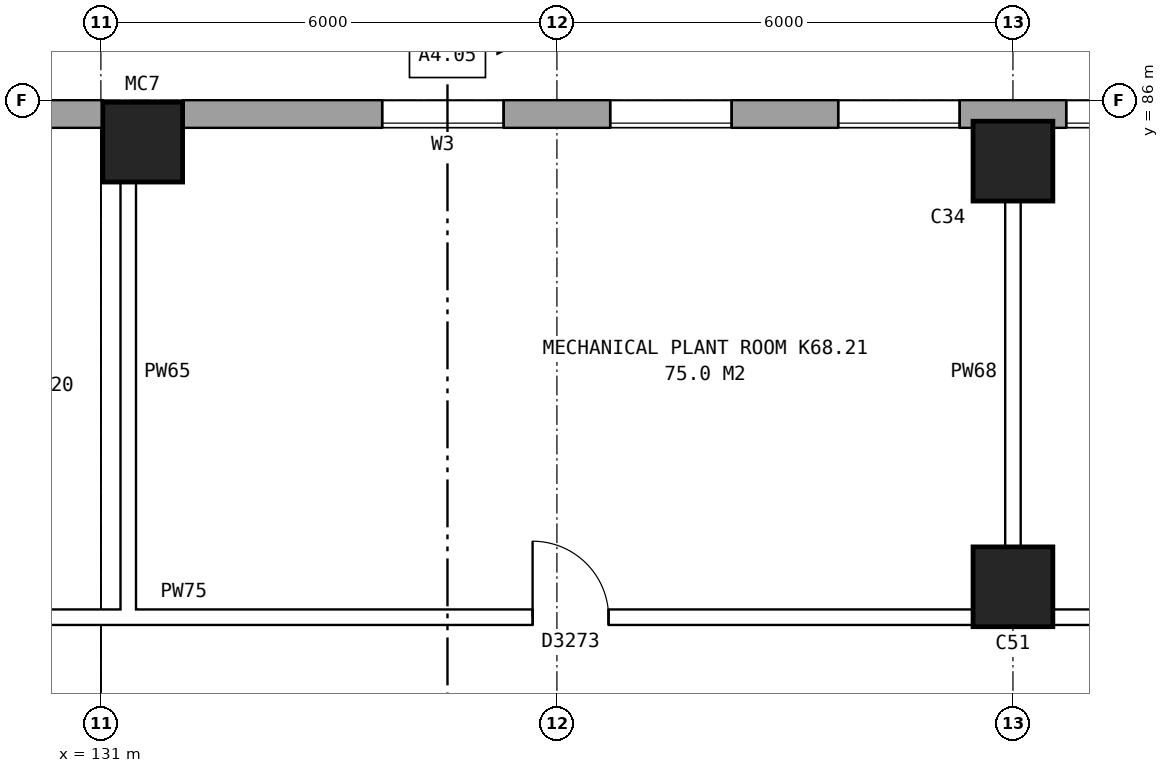
"""IFC4 building model, lengths in metres.
Left out: names, types, materials, properties, quantities, classifications, styles, units other than length and angle.
Written with IfcOpenShell. Run it as: python <this file> out.ifc"""

import sys

from ifc_helpers import new_model, si_unit, direction, frame, frame_2d, origin, origin_2d, place, context, subcontext, project, spatial, rectangle, hollow_rectangle, extrude, element, fill, save


model = new_model("IFC4")
c1 = context("Model", 3, precision=1e-05, world=origin(), true_north=direction((0.0, 1.0)))
c2 = subcontext(c1, "Body", "Model", "MODEL_VIEW")
j1 = project(units=[si_unit("LENGTHUNIT", "METRE"), si_unit("PLANEANGLEUNIT", "RADIAN")], contexts=[c1])
p1 = place(None, origin())
s1 = spatial("IfcSite", under=j1, at=p1, CompositionType="ELEMENT")
p2 = place(p1, origin())
s2 = spatial("IfcBuilding", under=s1, at=p2, CompositionType="ELEMENT")
p3 = place(p2, frame((0.0, 0.0, 243.9)))
s3 = spatial("IfcBuildingStorey", under=s2, at=p3, CompositionType="ELEMENT", Elevation=243.9)
p4 = place(p3, frame((143.0, 79.6, 0.0), z_axis=(0.0, 0.0, 1.0), x_axis=(1.0, 0.0, 0.0)))
e1 = element("IfcColumn", 1, at=p4, inside=s3, PredefinedType="COLUMN", context=c2, shape_type="SweptSolid", body=[
    extrude(rectangle(XDim=1.05, YDim=1.05, at=origin_2d()), origin(), (0.0, 0.0, 1.0), 15.563),
])
p5 = place(p3, frame((143.0, 85.2, 0.0), z_axis=(0.0, 0.0, 1.0), x_axis=(1.0, 0.0, 0.0)))
e2 = element("IfcColumn", 2, at=p5, inside=s3, PredefinedType="COLUMN", context=c2, shape_type="SweptSolid", body=[
    extrude(rectangle(XDim=1.05, YDim=1.05, at=origin_2d()), origin(), (0.0, 0.0, 1.0), 18.363),
])
p6 = place(p3, frame((131.55, 85.45, 0.0), z_axis=(0.0, 0.0, 1.0), x_axis=(1.0, 0.0, 0.0)))
e3 = element("IfcColumn", 3, at=p6, inside=s3, PredefinedType="COLUMN", context=c2, shape_type="SweptSolid", body=[
    extrude(hollow_rectangle(XDim=1.05, YDim=1.05, WallThickness=0.053, at=origin_2d()), origin(), (0.0, 0.0, 1.0), 18.488),
])
p7 = place(p3, frame((165.925, 85.82, 0.0), z_axis=(0.0, 0.0, 1.0), x_axis=(-1.0, 0.0, 0.0)))
e4 = element("IfcWall", 4, at=p7, inside=s3, PredefinedType="STANDARD", context=c2, shape_type="SweptSolid", body=[
    extrude(rectangle(XDim=33.85, YDim=0.36, at=frame_2d((16.925, 0.0))), origin(), (0.0, 0.0, 1.0), 19.21),
])
p8 = place(p7, frame((29.625, 0.0, 1.5)))
e5 = element("IfcOpeningElement", 5, at=p8, cuts=e4, PredefinedType="OPENING", context=c2, shape_type="SweptSolid", body=[
    extrude(rectangle(XDim=1.6, YDim=1.2, at=frame_2d((0.8, 0.6))), frame((0.0, 0.19, 0.0), z_axis=(0.0, -1.0, 0.0), x_axis=(1.0, 0.0, 0.0)), (0.0, 0.0, 1.0), 0.38),
])
p9 = place(p7, frame((26.625, 0.0, 1.5)))
e6 = element("IfcOpeningElement", 6, at=p9, cuts=e4, PredefinedType="OPENING", context=c2, shape_type="SweptSolid", body=[
    extrude(rectangle(XDim=1.6, YDim=1.2, at=frame_2d((0.8, 0.6))), frame((0.0, 0.19, 0.0), z_axis=(0.0, -1.0, 0.0), x_axis=(1.0, 0.0, 0.0)), (0.0, 0.0, 1.0), 0.38),
])
p10 = place(p7, frame((23.625, 0.0, 1.5)))
e7 = element("IfcOpeningElement", 7, at=p10, cuts=e4, PredefinedType="OPENING", context=c2, shape_type="SweptSolid", body=[
    extrude(rectangle(XDim=1.6, YDim=1.2, at=frame_2d((0.8, 0.6))), frame((0.0, 0.19, 0.0), z_axis=(0.0, -1.0, 0.0), x_axis=(1.0, 0.0, 0.0)), (0.0, 0.0, 1.0), 0.38),
])
p11 = place(p7, frame((20.625, 0.0, 1.5)))
e8 = element("IfcOpeningElement", 8, at=p11, cuts=e4, PredefinedType="OPENING", context=c2, shape_type="SweptSolid", body=[
    extrude(rectangle(XDim=1.6, YDim=1.2, at=frame_2d((0.8, 0.6))), frame((0.0, 0.19, 0.0), z_axis=(0.0, -1.0, 0.0), x_axis=(1.0, 0.0, 0.0)), (0.0, 0.0, 1.0), 0.38),
])
p12 = place(p7, frame((17.625, 0.0, 1.5)))
e9 = element("IfcOpeningElement", 9, at=p12, cuts=e4, PredefinedType="OPENING", context=c2, shape_type="SweptSolid", body=[
    extrude(rectangle(XDim=1.6, YDim=1.2, at=frame_2d((0.8, 0.6))), frame((0.0, 0.19, 0.0), z_axis=(0.0, -1.0, 0.0), x_axis=(1.0, 0.0, 0.0)), (0.0, 0.0, 1.0), 0.38),
])
p13 = place(p7, frame((14.625, 0.0, 1.5)))
e10 = element("IfcOpeningElement", 10, at=p13, cuts=e4, PredefinedType="OPENING", context=c2, shape_type="SweptSolid", body=[
    extrude(rectangle(XDim=1.6, YDim=1.2, at=frame_2d((0.8, 0.6))), frame((0.0, 0.19, 0.0), z_axis=(0.0, -1.0, 0.0), x_axis=(1.0, 0.0, 0.0)), (0.0, 0.0, 1.0), 0.38),
])
p14 = place(p7, frame((11.625, 0.0, 1.5)))
e11 = element("IfcOpeningElement", 11, at=p14, cuts=e4, PredefinedType="OPENING", context=c2, shape_type="SweptSolid", body=[
    extrude(rectangle(XDim=1.6, YDim=1.2, at=frame_2d((0.8, 0.6))), frame((0.0, 0.19, 0.0), z_axis=(0.0, -1.0, 0.0), x_axis=(1.0, 0.0, 0.0)), (0.0, 0.0, 1.0), 0.38),
])
p15 = place(p7, frame((8.625, 0.0, 1.5)))
e12 = element("IfcOpeningElement", 12, at=p15, cuts=e4, PredefinedType="OPENING", context=c2, shape_type="SweptSolid", body=[
    extrude(rectangle(XDim=1.6, YDim=1.2, at=frame_2d((0.8, 0.6))), frame((0.0, 0.19, 0.0), z_axis=(0.0, -1.0, 0.0), x_axis=(1.0, 0.0, 0.0)), (0.0, 0.0, 1.0), 0.38),
])
p16 = place(p7, frame((5.625, 0.0, 1.5)))
e13 = element("IfcOpeningElement", 13, at=p16, cuts=e4, PredefinedType="OPENING", context=c2, shape_type="SweptSolid", body=[
    extrude(rectangle(XDim=1.6, YDim=1.2, at=frame_2d((0.8, 0.6))), frame((0.0, 0.19, 0.0), z_axis=(0.0, -1.0, 0.0), x_axis=(1.0, 0.0, 0.0)), (0.0, 0.0, 1.0), 0.38),
])
p17 = place(p7, frame((2.625, 0.0, 1.5)))
e14 = element("IfcOpeningElement", 14, at=p17, cuts=e4, PredefinedType="OPENING", context=c2, shape_type="SweptSolid", body=[
    extrude(rectangle(XDim=1.6, YDim=1.2, at=frame_2d((0.8, 0.6))), frame((0.0, 0.19, 0.0), z_axis=(0.0, -1.0, 0.0), x_axis=(1.0, 0.0, 0.0)), (0.0, 0.0, 1.0), 0.38),
])
p18 = place(p3, frame((131.025, 85.82, 0.0), z_axis=(0.0, 0.0, 1.0), x_axis=(-1.0, 0.0, 0.0)))
e15 = element("IfcWall", 15, at=p18, inside=s3, PredefinedType="STANDARD", context=c2, shape_type="SweptSolid", body=[
    extrude(rectangle(XDim=55.05, YDim=0.36, at=frame_2d((27.525, 0.0))), origin(), (0.0, 0.0, 1.0), 19.21),
])
p19 = place(p18, frame((52.506, 0.0, 1.5)))
e16 = element("IfcOpeningElement", 16, at=p19, cuts=e15, PredefinedType="OPENING", context=c2, shape_type="SweptSolid", body=[
    extrude(rectangle(XDim=1.6, YDim=1.2, at=frame_2d((0.8, 0.6))), frame((0.0, 0.19, 0.0), z_axis=(0.0, -1.0, 0.0), x_axis=(1.0, 0.0, 0.0)), (0.0, 0.0, 1.0), 0.38),
])
p20 = place(p18, frame((49.069, 0.0, 1.5)))
e17 = element("IfcOpeningElement", 17, at=p20, cuts=e15, PredefinedType="OPENING", context=c2, shape_type="SweptSolid", body=[
    extrude(rectangle(XDim=1.6, YDim=1.2, at=frame_2d((0.8, 0.6))), frame((0.0, 0.19, 0.0), z_axis=(0.0, -1.0, 0.0), x_axis=(1.0, 0.0, 0.0)), (0.0, 0.0, 1.0), 0.38),
])
p21 = place(p18, frame((45.631, 0.0, 1.5)))
e18 = element("IfcOpeningElement", 18, at=p21, cuts=e15, PredefinedType="OPENING", context=c2, shape_type="SweptSolid", body=[
    extrude(rectangle(XDim=1.6, YDim=1.2, at=frame_2d((0.8, 0.6))), frame((0.0, 0.19, 0.0), z_axis=(0.0, -1.0, 0.0), x_axis=(1.0, 0.0, 0.0)), (0.0, 0.0, 1.0), 0.38),
])
p22 = place(p18, frame((42.194, 0.0, 1.5)))
e19 = element("IfcOpeningElement", 19, at=p22, cuts=e15, PredefinedType="OPENING", context=c2, shape_type="SweptSolid", body=[
    extrude(rectangle(XDim=1.6, YDim=1.2, at=frame_2d((0.8, 0.6))), frame((0.0, 0.19, 0.0), z_axis=(0.0, -1.0, 0.0), x_axis=(1.0, 0.0, 0.0)), (0.0, 0.0, 1.0), 0.38),
])
p23 = place(p18, frame((38.756, 0.0, 1.5)))
e20 = element("IfcOpeningElement", 20, at=p23, cuts=e15, PredefinedType="OPENING", context=c2, shape_type="SweptSolid", body=[
    extrude(rectangle(XDim=1.6, YDim=1.2, at=frame_2d((0.8, 0.6))), frame((0.0, 0.19, 0.0), z_axis=(0.0, -1.0, 0.0), x_axis=(1.0, 0.0, 0.0)), (0.0, 0.0, 1.0), 0.38),
])
p24 = place(p18, frame((35.319, 0.0, 1.5)))
e21 = element("IfcOpeningElement", 21, at=p24, cuts=e15, PredefinedType="OPENING", context=c2, shape_type="SweptSolid", body=[
    extrude(rectangle(XDim=1.6, YDim=1.2, at=frame_2d((0.8, 0.6))), frame((0.0, 0.19, 0.0), z_axis=(0.0, -1.0, 0.0), x_axis=(1.0, 0.0, 0.0)), (0.0, 0.0, 1.0), 0.38),
])
p25 = place(p18, frame((31.881, 0.0, 1.5)))
e22 = element("IfcOpeningElement", 22, at=p25, cuts=e15, PredefinedType="OPENING", context=c2, shape_type="SweptSolid", body=[
    extrude(rectangle(XDim=1.6, YDim=1.2, at=frame_2d((0.8, 0.6))), frame((0.0, 0.19, 0.0), z_axis=(0.0, -1.0, 0.0), x_axis=(1.0, 0.0, 0.0)), (0.0, 0.0, 1.0), 0.38),
])
p26 = place(p18, frame((28.444, 0.0, 1.5)))
e23 = element("IfcOpeningElement", 23, at=p26, cuts=e15, PredefinedType="OPENING", context=c2, shape_type="SweptSolid", body=[
    extrude(rectangle(XDim=1.6, YDim=1.2, at=frame_2d((0.8, 0.6))), frame((0.0, 0.19, 0.0), z_axis=(0.0, -1.0, 0.0), x_axis=(1.0, 0.0, 0.0)), (0.0, 0.0, 1.0), 0.38),
])
p27 = place(p18, frame((25.006, 0.0, 1.5)))
e24 = element("IfcOpeningElement", 24, at=p27, cuts=e15, PredefinedType="OPENING", context=c2, shape_type="SweptSolid", body=[
    extrude(rectangle(XDim=1.6, YDim=1.2, at=frame_2d((0.8, 0.6))), frame((0.0, 0.19, 0.0), z_axis=(0.0, -1.0, 0.0), x_axis=(1.0, 0.0, 0.0)), (0.0, 0.0, 1.0), 0.38),
])
p28 = place(p18, frame((21.569, 0.0, 1.5)))
e25 = element("IfcOpeningElement", 25, at=p28, cuts=e15, PredefinedType="OPENING", context=c2, shape_type="SweptSolid", body=[
    extrude(rectangle(XDim=1.6, YDim=1.2, at=frame_2d((0.8, 0.6))), frame((0.0, 0.19, 0.0), z_axis=(0.0, -1.0, 0.0), x_axis=(1.0, 0.0, 0.0)), (0.0, 0.0, 1.0), 0.38),
])
p29 = place(p18, frame((18.131, 0.0, 1.5)))
e26 = element("IfcOpeningElement", 26, at=p29, cuts=e15, PredefinedType="OPENING", context=c2, shape_type="SweptSolid", body=[
    extrude(rectangle(XDim=1.6, YDim=1.2, at=frame_2d((0.8, 0.6))), frame((0.0, 0.19, 0.0), z_axis=(0.0, -1.0, 0.0), x_axis=(1.0, 0.0, 0.0)), (0.0, 0.0, 1.0), 0.38),
])
p30 = place(p18, frame((14.694, 0.0, 1.5)))
e27 = element("IfcOpeningElement", 27, at=p30, cuts=e15, PredefinedType="OPENING", context=c2, shape_type="SweptSolid", body=[
    extrude(rectangle(XDim=1.6, YDim=1.2, at=frame_2d((0.8, 0.6))), frame((0.0, 0.19, 0.0), z_axis=(0.0, -1.0, 0.0), x_axis=(1.0, 0.0, 0.0)), (0.0, 0.0, 1.0), 0.38),
])
p31 = place(p18, frame((11.256, 0.0, 1.5)))
e28 = element("IfcOpeningElement", 28, at=p31, cuts=e15, PredefinedType="OPENING", context=c2, shape_type="SweptSolid", body=[
    extrude(rectangle(XDim=1.6, YDim=1.2, at=frame_2d((0.8, 0.6))), frame((0.0, 0.19, 0.0), z_axis=(0.0, -1.0, 0.0), x_axis=(1.0, 0.0, 0.0)), (0.0, 0.0, 1.0), 0.38),
])
p32 = place(p18, frame((7.819, 0.0, 1.5)))
e29 = element("IfcOpeningElement", 29, at=p32, cuts=e15, PredefinedType="OPENING", context=c2, shape_type="SweptSolid", body=[
    extrude(rectangle(XDim=1.6, YDim=1.2, at=frame_2d((0.8, 0.6))), frame((0.0, 0.19, 0.0), z_axis=(0.0, -1.0, 0.0), x_axis=(1.0, 0.0, 0.0)), (0.0, 0.0, 1.0), 0.38),
])
p33 = place(p18, frame((4.381, 0.0, 1.5)))
e30 = element("IfcOpeningElement", 30, at=p33, cuts=e15, PredefinedType="OPENING", context=c2, shape_type="SweptSolid", body=[
    extrude(rectangle(XDim=1.6, YDim=1.2, at=frame_2d((0.8, 0.6))), frame((0.0, 0.19, 0.0), z_axis=(0.0, -1.0, 0.0), x_axis=(1.0, 0.0, 0.0)), (0.0, 0.0, 1.0), 0.38),
])
p34 = place(p18, frame((0.944, 0.0, 1.5)))
e31 = element("IfcOpeningElement", 31, at=p34, cuts=e15, PredefinedType="OPENING", context=c2, shape_type="SweptSolid", body=[
    extrude(rectangle(XDim=1.6, YDim=1.2, at=frame_2d((0.8, 0.6))), frame((0.0, 0.19, 0.0), z_axis=(0.0, -1.0, 0.0), x_axis=(1.0, 0.0, 0.0)), (0.0, 0.0, 1.0), 0.38),
])
p35 = place(p3, frame((32.24, 79.2, 0.0), z_axis=(0.0, 0.0, 1.0), x_axis=(1.0, 0.0, 0.0)))
e32 = element("IfcWall", 32, at=p35, inside=s3, PredefinedType="PARTITIONING", context=c2, shape_type="SweptSolid", body=[
    extrude(rectangle(XDim=136.52, YDim=0.2, at=frame_2d((68.26, 0.0))), origin(), (0.0, 0.0, 1.0), 3.3),
])
p36 = place(p35, frame((3.44, 0.0, 0.0)))
e33 = element("IfcOpeningElement", 33, at=p36, cuts=e32, PredefinedType="OPENING", context=c2, shape_type="SweptSolid", body=[
    extrude(rectangle(XDim=1.0, YDim=2.1, at=frame_2d((0.5, 1.05))), frame((0.0, 0.11, 0.0), z_axis=(0.0, -1.0, 0.0), x_axis=(1.0, 0.0, 0.0)), (0.0, 0.0, 1.0), 0.22),
])
p37 = place(p35, frame((13.26, 0.0, 0.0)))
e34 = element("IfcOpeningElement", 34, at=p37, cuts=e32, PredefinedType="OPENING", context=c2, shape_type="SweptSolid", body=[
    extrude(rectangle(XDim=1.0, YDim=2.1, at=frame_2d((0.5, 1.05))), frame((0.0, 0.11, 0.0), z_axis=(0.0, -1.0, 0.0), x_axis=(1.0, 0.0, 0.0)), (0.0, 0.0, 1.0), 0.22),
])
p38 = place(p35, frame((25.26, 0.0, 0.0)))
e35 = element("IfcOpeningElement", 35, at=p38, cuts=e32, PredefinedType="OPENING", context=c2, shape_type="SweptSolid", body=[
    extrude(rectangle(XDim=1.0, YDim=2.1, at=frame_2d((0.5, 1.05))), frame((0.0, 0.11, 0.0), z_axis=(0.0, -1.0, 0.0), x_axis=(1.0, 0.0, 0.0)), (0.0, 0.0, 1.0), 0.22),
])
p39 = place(p35, frame((37.08, 0.0, 0.0)))
e36 = element("IfcOpeningElement", 36, at=p39, cuts=e32, PredefinedType="OPENING", context=c2, shape_type="SweptSolid", body=[
    extrude(rectangle(XDim=1.0, YDim=2.1, at=frame_2d((0.5, 1.05))), frame((0.0, 0.11, 0.0), z_axis=(0.0, -1.0, 0.0), x_axis=(1.0, 0.0, 0.0)), (0.0, 0.0, 1.0), 0.22),
])
p40 = place(p35, frame((49.955, 0.0, 0.0)))
e37 = element("IfcOpeningElement", 37, at=p40, cuts=e32, PredefinedType="OPENING", context=c2, shape_type="SweptSolid", body=[
    extrude(rectangle(XDim=1.0, YDim=2.1, at=frame_2d((0.5, 1.05))), frame((0.0, 0.11, 0.0), z_axis=(0.0, -1.0, 0.0), x_axis=(1.0, 0.0, 0.0)), (0.0, 0.0, 1.0), 0.22),
])
p41 = place(p35, frame((67.322, 0.0, 0.0)))
e38 = element("IfcOpeningElement", 38, at=p41, cuts=e32, PredefinedType="OPENING", context=c2, shape_type="SweptSolid", body=[
    extrude(rectangle(XDim=1.0, YDim=2.1, at=frame_2d((0.5, 1.05))), frame((0.0, 0.11, 0.0), z_axis=(0.0, -1.0, 0.0), x_axis=(1.0, 0.0, 0.0)), (0.0, 0.0, 1.0), 0.22),
])
p42 = place(p35, frame((84.51, 0.0, 0.0)))
e39 = element("IfcOpeningElement", 39, at=p42, cuts=e32, PredefinedType="OPENING", context=c2, shape_type="SweptSolid", body=[
    extrude(rectangle(XDim=1.0, YDim=2.1, at=frame_2d((0.5, 1.05))), frame((0.0, 0.11, 0.0), z_axis=(0.0, -1.0, 0.0), x_axis=(1.0, 0.0, 0.0)), (0.0, 0.0, 1.0), 0.22),
])
p43 = place(p35, frame((95.003, 0.0, 0.0)))
e40 = element("IfcOpeningElement", 40, at=p43, cuts=e32, PredefinedType="OPENING", context=c2, shape_type="SweptSolid", body=[
    extrude(rectangle(XDim=1.0, YDim=2.1, at=frame_2d((0.5, 1.05))), frame((0.0, 0.11, 0.0), z_axis=(0.0, -1.0, 0.0), x_axis=(1.0, 0.0, 0.0)), (0.0, 0.0, 1.0), 0.22),
])
p44 = place(p35, frame((104.44, 0.0, 0.0)))
e41 = element("IfcOpeningElement", 41, at=p44, cuts=e32, PredefinedType="OPENING", context=c2, shape_type="SweptSolid", body=[
    extrude(rectangle(XDim=1.0, YDim=2.1, at=frame_2d((0.5, 1.05))), frame((0.0, 0.11, 0.0), z_axis=(0.0, -1.0, 0.0), x_axis=(1.0, 0.0, 0.0)), (0.0, 0.0, 1.0), 0.22),
])
p45 = place(p35, frame((123.48, 0.0, 0.0)))
e42 = element("IfcOpeningElement", 42, at=p45, cuts=e32, PredefinedType="OPENING", context=c2, shape_type="SweptSolid", body=[
    extrude(rectangle(XDim=1.0, YDim=2.1, at=frame_2d((0.5, 1.05))), frame((0.0, 0.11, 0.0), z_axis=(0.0, -1.0, 0.0), x_axis=(1.0, 0.0, 0.0)), (0.0, 0.0, 1.0), 0.22),
])
for number, where, z_axis, x_axis in (
    (43, (131.36, 79.1, 0.0), (0.0, 0.0, 1.0), (0.0, 1.0, 0.0)),
    (44, (143.0, 79.1, 0.0), (0.0, 0.0, 1.0), (0.0, 1.0, 0.0)),
):
    element("IfcWall", number, at=place(p3, frame(where, z_axis=z_axis, x_axis=x_axis)), inside=s3, PredefinedType="PARTITIONING", context=c2, shape_type="SweptSolid", body=[
        extrude(rectangle(XDim=6.66, YDim=0.2, at=frame_2d((3.33, 0.0))), origin(), (0.0, 0.0, 1.0), 3.3),
    ])
p46 = place(p8, origin())
e45 = element("IfcWindow", 45, at=p46, inside=s3, PartitioningType="DOUBLE_PANEL_HORIZONTAL", PredefinedType="WINDOW", context=c2, shape_type="SweptSolid", body=[
    extrude(rectangle(XDim=1.6, YDim=1.2, at=frame_2d((0.8, 0.6))), frame((0.0, 0.15, 0.0), z_axis=(0.0, -1.0, 0.0), x_axis=(1.0, 0.0, 0.0)), (0.0, 0.0, 1.0), 0.06),
])
fill(e5, e45)
p47 = place(p9, origin())
e46 = element("IfcWindow", 46, at=p47, inside=s3, PartitioningType="DOUBLE_PANEL_HORIZONTAL", PredefinedType="WINDOW", context=c2, shape_type="SweptSolid", body=[
    extrude(rectangle(XDim=1.6, YDim=1.2, at=frame_2d((0.8, 0.6))), frame((0.0, 0.15, 0.0), z_axis=(0.0, -1.0, 0.0), x_axis=(1.0, 0.0, 0.0)), (0.0, 0.0, 1.0), 0.06),
])
fill(e6, e46)
p48 = place(p10, origin())
e47 = element("IfcWindow", 47, at=p48, inside=s3, PartitioningType="DOUBLE_PANEL_HORIZONTAL", PredefinedType="WINDOW", context=c2, shape_type="SweptSolid", body=[
    extrude(rectangle(XDim=1.6, YDim=1.2, at=frame_2d((0.8, 0.6))), frame((0.0, 0.15, 0.0), z_axis=(0.0, -1.0, 0.0), x_axis=(1.0, 0.0, 0.0)), (0.0, 0.0, 1.0), 0.06),
])
fill(e7, e47)
p49 = place(p11, origin())
e48 = element("IfcWindow", 48, at=p49, inside=s3, PartitioningType="DOUBLE_PANEL_HORIZONTAL", PredefinedType="WINDOW", context=c2, shape_type="SweptSolid", body=[
    extrude(rectangle(XDim=1.6, YDim=1.2, at=frame_2d((0.8, 0.6))), frame((0.0, 0.15, 0.0), z_axis=(0.0, -1.0, 0.0), x_axis=(1.0, 0.0, 0.0)), (0.0, 0.0, 1.0), 0.06),
])
fill(e8, e48)
p50 = place(p44, origin())
e49 = element("IfcDoor", 49, at=p50, inside=s3, OperationType="SINGLE_SWING_LEFT", PredefinedType="DOOR", context=c2, shape_type="SweptSolid", body=[
    extrude(rectangle(XDim=1.0, YDim=2.1, at=frame_2d((0.5, 1.05))), frame((0.0, 0.025, 0.0), z_axis=(0.0, -1.0, 0.0), x_axis=(1.0, 0.0, 0.0)), (0.0, 0.0, 1.0), 0.05),
])
fill(e41, e49)
save(model, sys.argv[1])
